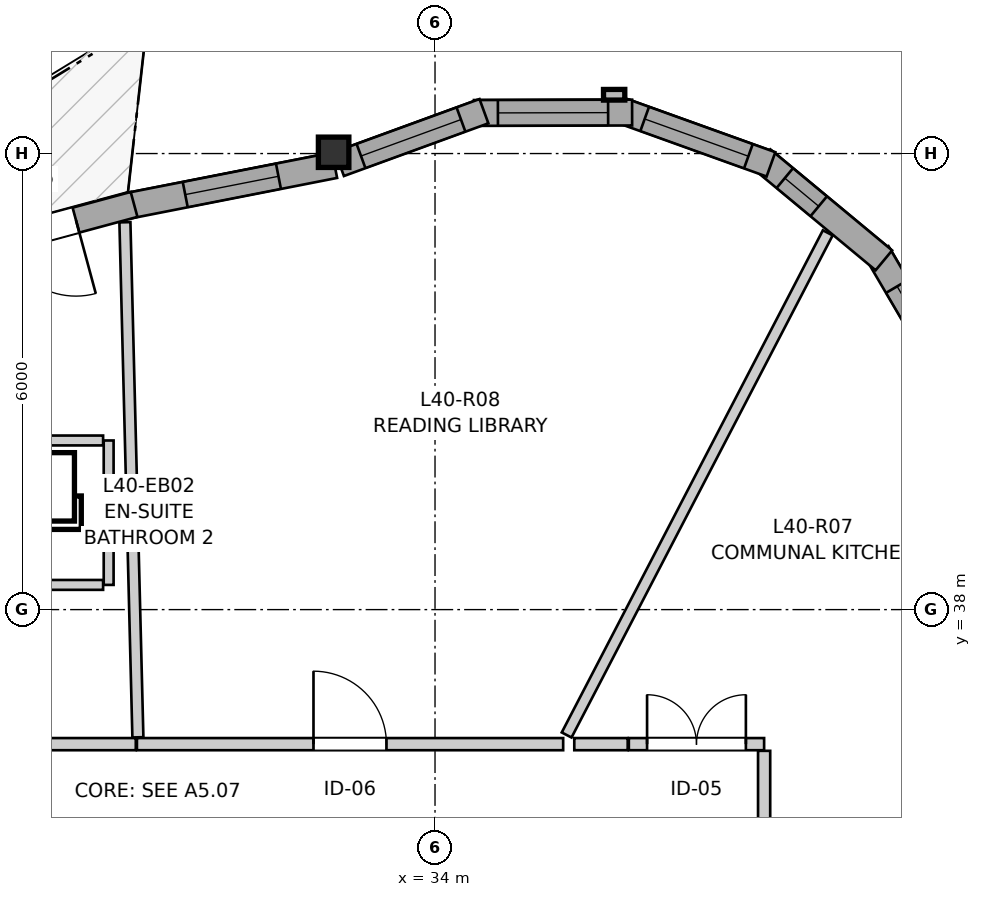
"""IFC4 building model, lengths in metres.
Left out: names, types, materials, properties, quantities, classifications, styles, units other than length and angle.
Written with IfcOpenShell. Run it as: python <this file> out.ifc"""

import sys

from ifc_helpers import new_model, si_unit, direction, frame, frame_2d, origin, origin_2d, place, context, subcontext, project, spatial, rectangle, i_section, extrude, source, transform, mapped, element, fill, save


model = new_model("IFC4")
c1 = context("Model", 3, precision=1e-05, world=origin(), true_north=direction((0.0, 1.0)))
c2 = subcontext(c1, "Body", "Model", "MODEL_VIEW")
j1 = project(units=[si_unit("LENGTHUNIT", "METRE"), si_unit("PLANEANGLEUNIT", "RADIAN")], contexts=[c1])
p1 = place(None, origin())
s1 = spatial("IfcSite", under=j1, at=p1, CompositionType="ELEMENT")
p2 = place(p1, origin())
s2 = spatial("IfcBuilding", under=s1, at=p2, CompositionType="ELEMENT")
p3 = place(p2, frame((0.0, 0.0, 136.2)))
s3 = spatial("IfcBuildingStorey", under=s2, at=p3, CompositionType="ELEMENT", Elevation=136.2)
m1 = source(origin(), c2, "Body", "SweptSolid", [
    extrude(i_section(OverallWidth=0.401, OverallDepth=0.399, WebThickness=0.023, FlangeThickness=0.036, FilletRadius=0.015, at=origin_2d()), origin(), (0.0, 0.0, 1.0), 2.95),
])
p4 = place(p3, frame((32.666, 44.017, 0.0), z_axis=(0.0, 0.0, 1.0), x_axis=(1.0, 0.0, 0.0)))
e1 = element("IfcColumn", 1, at=p4, inside=s3, PredefinedType="PILASTER", context=c2, shape_type="MappedRepresentation", body=[
    mapped(m1, transform((0.0, 0.0, 0.0), x_axis=(1.0, 0.0, 0.0), y_axis=(0.0, 1.0, 0.0), z_axis=(0.0, 0.0, 1.0), scale=1.0)),
])
p5 = place(p3, frame((40.873, 40.902, 0.0), z_axis=(0.0, 0.0, 1.0), x_axis=(-0.506225227923, 0.862401309493, 0.0)))
e2 = element("IfcWall", 2, at=p5, inside=s3, PredefinedType="SOLIDWALL", context=c2, shape_type="SweptSolid", body=[
    extrude(rectangle(XDim=2.081, YDim=0.34, at=frame_2d((1.041, 0.0))), origin(), (0.0, 0.0, 1.0), 2.53),
])
p6 = place(p5, frame((0.516, 0.0, 0.82)))
e3 = element("IfcOpeningElement", 3, at=p6, cuts=e2, PredefinedType="OPENING", context=c2, shape_type="SweptSolid", body=[
    extrude(rectangle(XDim=1.05, YDim=1.45, at=frame_2d((0.525, 0.725))), frame((0.0, 0.18, 0.0), z_axis=(0.0, -1.0, 0.0), x_axis=(1.0, 0.0, 0.0)), (0.0, 0.0, 1.0), 0.36),
])
p7 = place(p3, frame((39.906, 42.595, 0.0), z_axis=(0.0, 0.0, 1.0), x_axis=(-0.769584999316, 0.638544382817, 0.0)))
e4 = element("IfcWall", 4, at=p7, inside=s3, PredefinedType="SOLIDWALL", context=c2, shape_type="SweptSolid", body=[
    extrude(rectangle(XDim=2.081, YDim=0.34, at=frame_2d((1.041, 0.0))), origin(), (0.0, 0.0, 1.0), 2.53),
])
p8 = place(p7, frame((1.114, 0.0, 0.82)))
e5 = element("IfcOpeningElement", 5, at=p8, cuts=e4, PredefinedType="OPENING", context=c2, shape_type="SweptSolid", body=[
    extrude(rectangle(XDim=0.58, YDim=1.35, at=frame_2d((0.29, 0.675))), frame((0.0, 0.18, 0.0), z_axis=(0.0, -1.0, 0.0), x_axis=(1.0, 0.0, 0.0)), (0.0, 0.0, 1.0), 0.36),
])
p9 = place(p3, frame((38.42, 43.858, 0.0), z_axis=(0.0, 0.0, 1.0), x_axis=(-0.941071215914, 0.338208466153, 0.0)))
e6 = element("IfcWall", 6, at=p9, inside=s3, PredefinedType="SOLIDWALL", context=c2, shape_type="SweptSolid", body=[
    extrude(rectangle(XDim=2.081, YDim=0.34, at=frame_2d((1.041, 0.0))), origin(), (0.0, 0.0, 1.0), 2.53),
])
p10 = place(p9, frame((0.316, 0.0, 0.82)))
e7 = element("IfcOpeningElement", 7, at=p10, cuts=e6, PredefinedType="OPENING", context=c2, shape_type="SweptSolid", body=[
    extrude(rectangle(XDim=1.45, YDim=1.25, at=frame_2d((0.725, 0.625))), frame((0.0, 0.18, 0.0), z_axis=(0.0, -1.0, 0.0), x_axis=(1.0, 0.0, 0.0)), (0.0, 0.0, 1.0), 0.36),
])
p11 = place(p3, frame((36.593, 44.539, 0.0), z_axis=(0.0, 0.0, 1.0), x_axis=(-0.999996965272, -0.002463624621, 0.0)))
e8 = element("IfcWall", 8, at=p11, inside=s3, PredefinedType="SOLIDWALL", context=c2, shape_type="SweptSolid", body=[
    extrude(rectangle(XDim=2.081, YDim=0.34, at=frame_2d((1.041, 0.0))), origin(), (0.0, 0.0, 1.0), 2.53),
])
p12 = place(p11, frame((0.316, 0.0, 0.82)))
e9 = element("IfcOpeningElement", 9, at=p12, cuts=e8, PredefinedType="OPENING", context=c2, shape_type="SweptSolid", body=[
    extrude(rectangle(XDim=1.45, YDim=1.25, at=frame_2d((0.725, 0.625))), frame((0.0, 0.18, 0.0), z_axis=(0.0, -1.0, 0.0), x_axis=(1.0, 0.0, 0.0)), (0.0, 0.0, 1.0), 0.36),
])
p13 = place(p3, frame((34.644, 44.557, 0.0), z_axis=(0.0, 0.0, 1.0), x_axis=(-0.939440593615, -0.342711790092, 0.0)))
e10 = element("IfcWall", 10, at=p13, inside=s3, PredefinedType="SOLIDWALL", context=c2, shape_type="SweptSolid", body=[
    extrude(rectangle(XDim=2.023, YDim=0.34, at=frame_2d((1.012, 0.0))), origin(), (0.0, 0.0, 1.0), 2.53),
])
p14 = place(p13, frame((0.322, 0.0, 0.82)))
e11 = element("IfcOpeningElement", 11, at=p14, cuts=e10, PredefinedType="OPENING", context=c2, shape_type="SweptSolid", body=[
    extrude(rectangle(XDim=1.4, YDim=1.35, at=frame_2d((0.7, 0.675))), frame((0.0, 0.18, 0.0), z_axis=(0.0, -1.0, 0.0), x_axis=(1.0, 0.0, 0.0)), (0.0, 0.0, 1.0), 0.36),
])
p15 = place(p3, frame((32.679, 43.846, 0.0), z_axis=(0.0, 0.0, 1.0), x_axis=(-0.981247929568, -0.192749839736, 0.0)))
e12 = element("IfcWall", 12, at=p15, inside=s3, PredefinedType="SOLIDWALL", context=c2, shape_type="SweptSolid", body=[
    extrude(rectangle(XDim=2.776, YDim=0.34, at=frame_2d((1.388, 0.0))), origin(), (0.0, 0.0, 1.0), 2.53),
])
p16 = place(p15, frame((0.753, 0.0, 0.82)))
e13 = element("IfcOpeningElement", 13, at=p16, cuts=e12, PredefinedType="OPENING", context=c2, shape_type="SweptSolid", body=[
    extrude(rectangle(XDim=1.25, YDim=1.35, at=frame_2d((0.625, 0.675))), frame((0.0, 0.18, 0.0), z_axis=(0.0, -1.0, 0.0), x_axis=(1.0, 0.0, 0.0)), (0.0, 0.0, 1.0), 0.36),
])
p17 = place(p3, frame((30.04, 43.331, 0.0), z_axis=(0.0, 0.0, 1.0), x_axis=(-0.965460468502, -0.260549580233, 0.0)))
e14 = element("IfcWall", 14, at=p17, inside=s3, PredefinedType="SOLIDWALL", context=c2, shape_type="SweptSolid", body=[
    extrude(rectangle(XDim=2.583, YDim=0.34, at=frame_2d((1.292, 0.0))), origin(), (0.0, 0.0, 1.0), 2.53),
])
p18 = place(p17, frame((0.792, 0.0, 0.0)))
e15 = element("IfcOpeningElement", 15, at=p18, cuts=e14, PredefinedType="OPENING", context=c2, shape_type="SweptSolid", body=[
    extrude(rectangle(XDim=1.0, YDim=2.1, at=frame_2d((0.5, 1.05))), frame((0.0, 0.18, 0.0), z_axis=(0.0, -1.0, 0.0), x_axis=(1.0, 0.0, 0.0)), (0.0, 0.0, 1.0), 0.36),
])
p19 = place(p3, frame((30.078, 36.23, 0.0), z_axis=(0.0, 0.0, 1.0), x_axis=(1.0, 0.0, 0.0)))
e16 = element("IfcWall", 16, at=p19, inside=s3, PredefinedType="PARTITIONING", context=c2, shape_type="SweptSolid", body=[
    extrude(rectangle(XDim=5.608, YDim=0.16, at=frame_2d((2.804, 0.0))), origin(), (0.0, 0.0, 1.0), 2.588),
])
p20 = place(p19, frame((2.323, 0.0, 0.0)))
e17 = element("IfcOpeningElement", 17, at=p20, cuts=e16, PredefinedType="OPENING", context=c2, shape_type="SweptSolid", body=[
    extrude(rectangle(XDim=0.96, YDim=2.1, at=frame_2d((0.48, 1.05))), frame((0.0, 0.09, 0.0), z_axis=(0.0, -1.0, 0.0), x_axis=(1.0, 0.0, 0.0)), (0.0, 0.0, 1.0), 0.18),
])
p21 = place(p3, frame((25.99, 36.23, 0.0), z_axis=(0.0, 0.0, 1.0), x_axis=(1.0, 0.0, 0.0)))
e18 = element("IfcWall", 18, at=p21, inside=s3, PredefinedType="PARTITIONING", context=c2, shape_type="SweptSolid", body=[
    extrude(rectangle(XDim=4.073, YDim=0.16, at=frame_2d((2.037, 0.0))), origin(), (0.0, 0.0, 1.0), 2.95),
])
p22 = place(p21, frame((1.6, 0.0, 0.0)))
e19 = element("IfcOpeningElement", 19, at=p22, cuts=e18, PredefinedType="OPENING", context=c2, shape_type="SweptSolid", body=[
    extrude(rectangle(XDim=0.92, YDim=2.1, at=frame_2d((0.46, 1.05))), frame((0.0, 0.09, 0.0), z_axis=(0.0, -1.0, 0.0), x_axis=(1.0, 0.0, 0.0)), (0.0, 0.0, 1.0), 0.18),
])
p23 = place(p3, frame((36.55, 36.23, 0.0), z_axis=(0.0, 0.0, 1.0), x_axis=(1.0, 0.0, 0.0)))
e20 = element("IfcWall", 20, at=p23, inside=s3, PredefinedType="PARTITIONING", context=c2, shape_type="SweptSolid", body=[
    extrude(rectangle(XDim=1.78, YDim=0.16, at=frame_2d((0.89, 0.0))), origin(), (0.0, 0.0, 1.0), 2.95),
])
p24 = place(p23, frame((0.24, 0.0, 0.0)))
e21 = element("IfcOpeningElement", 21, at=p24, cuts=e20, PredefinedType="OPENING", context=c2, shape_type="SweptSolid", body=[
    extrude(rectangle(XDim=1.3, YDim=2.1, at=frame_2d((0.65, 1.05))), frame((0.0, 0.09, 0.0), z_axis=(0.0, -1.0, 0.0), x_axis=(1.0, 0.0, 0.0)), (0.0, 0.0, 1.0), 0.18),
])
p25 = place(p3, frame((35.732, 36.351, 0.0), z_axis=(0.0, 0.0, 1.0), x_axis=(0.461386804, 0.887199085378, 0.0)))
e22 = element("IfcWall", 22, at=p25, inside=s3, PredefinedType="PARTITIONING", context=c2, shape_type="SweptSolid", body=[
    extrude(rectangle(XDim=7.446, YDim=0.145, at=frame_2d((3.723, 0.0))), origin(), (0.0, 0.0, 1.0), 2.95),
])
p26 = place(p3, frame((29.92, 43.096, 0.0), z_axis=(0.0, 0.0, 1.0), x_axis=(0.025211755772, -0.999682133166, 0.0)))
e23 = element("IfcWall", 23, at=p26, inside=s3, PredefinedType="PARTITIONING", context=c2, shape_type="SweptSolid", body=[
    extrude(rectangle(XDim=6.779, YDim=0.145, at=frame_2d((3.389, 0.0))), origin(), (0.0, 0.0, 1.0), 2.95),
])
p27 = place(p3, frame((38.465, 33.405, 0.0), z_axis=(0.0, 0.0, 1.0), x_axis=(0.738623645331, 0.674118024205, 0.0)))
e24 = element("IfcWall", 24, at=p27, inside=s3, PredefinedType="PARTITIONING", context=c2, shape_type="SweptSolid", body=[
    extrude(rectangle(XDim=4.629, YDim=0.145, at=frame_2d((2.314, 0.0))), origin(), (0.0, 0.0, 1.0), 2.95),
])
p28 = place(p3, frame((29.706, 38.325, 0.0), z_axis=(0.0, 0.0, 1.0), x_axis=(0.0, 1.0, 0.0)))
e25 = element("IfcWall", 25, at=p28, inside=s3, PredefinedType="PARTITIONING", context=c2, shape_type="SweptSolid", body=[
    extrude(rectangle(XDim=1.9, YDim=0.13, at=frame_2d((0.95, 0.0))), origin(), (0.0, 0.0, 1.0), 2.95),
])
p29 = place(p3, frame((27.979, 40.225, 0.0), z_axis=(0.0, 0.0, 1.0), x_axis=(1.0, 0.0, 0.0)))
e26 = element("IfcWall", 26, at=p29, inside=s3, PredefinedType="PARTITIONING", context=c2, shape_type="SweptSolid", body=[
    extrude(rectangle(XDim=1.654, YDim=0.13, at=frame_2d((0.827, 0.0))), origin(), (0.0, 0.0, 1.0), 2.558),
])
p30 = place(p3, frame((27.979, 38.325, 0.0), z_axis=(0.0, 0.0, 1.0), x_axis=(1.0, 0.0, 0.0)))
e27 = element("IfcWall", 27, at=p30, inside=s3, PredefinedType="PARTITIONING", context=c2, shape_type="SweptSolid", body=[
    extrude(rectangle(XDim=1.654, YDim=0.13, at=frame_2d((0.827, 0.0))), origin(), (0.0, 0.0, 1.0), 2.95),
])
p31 = place(p3, frame((38.33, 34.45, 0.0), z_axis=(0.0, 0.0, 1.0), x_axis=(0.0, 1.0, 0.0)))
e28 = element("IfcWall", 28, at=p31, inside=s3, PredefinedType="PARTITIONING", context=c2, shape_type="SweptSolid", body=[
    extrude(rectangle(XDim=1.692, YDim=0.16, at=frame_2d((0.846, 0.0))), origin(), (0.0, 0.0, 1.0), 2.588),
])
p32 = place(p3, frame((35.832, 36.23, 0.0), z_axis=(0.0, 0.0, 1.0), x_axis=(1.0, 0.0, 0.0)))
e29 = element("IfcWall", 29, at=p32, inside=s3, PredefinedType="PARTITIONING", context=c2, shape_type="SweptSolid", body=[
    extrude(rectangle(XDim=0.703, YDim=0.16, at=frame_2d((0.351, 0.0))), origin(), (0.0, 0.0, 1.0), 2.95),
])
m2 = source(origin(), c2, "Body", "SweptSolid", [
    extrude(rectangle(XDim=1.05, YDim=1.45, at=frame_2d((0.525, 0.725))), frame((0.0, 0.03, 0.0), z_axis=(0.0, -1.0, 0.0), x_axis=(1.0, 0.0, 0.0)), (0.0, 0.0, 1.0), 0.06),
])
p33 = place(p6, origin())
e30 = element("IfcWindow", 30, at=p33, inside=s3, PartitioningType="SINGLE_PANEL", PredefinedType="WINDOW", context=c2, shape_type="MappedRepresentation", body=[
    mapped(m2, transform((0.0, 0.0, 0.0), x_axis=(1.0, 0.0, 0.0), y_axis=(0.0, 1.0, 0.0), z_axis=(0.0, 0.0, 1.0), scale=1.0)),
])
fill(e3, e30)
m3 = source(origin(), c2, "Body", "SweptSolid", [
    extrude(rectangle(XDim=0.58, YDim=1.35, at=frame_2d((0.29, 0.675))), frame((0.0, 0.03, 0.0), z_axis=(0.0, -1.0, 0.0), x_axis=(1.0, 0.0, 0.0)), (0.0, 0.0, 1.0), 0.06),
])
p34 = place(p8, origin())
e31 = element("IfcWindow", 31, at=p34, inside=s3, PartitioningType="SINGLE_PANEL", PredefinedType="WINDOW", context=c2, shape_type="MappedRepresentation", body=[
    mapped(m3, transform((0.0, 0.0, 0.0), x_axis=(1.0, 0.0, 0.0), y_axis=(0.0, 1.0, 0.0), z_axis=(0.0, 0.0, 1.0), scale=1.0)),
])
fill(e5, e31)
m4 = source(origin(), c2, "Body", "SweptSolid", [
    extrude(rectangle(XDim=1.45, YDim=1.25, at=frame_2d((0.725, 0.625))), frame((0.0, 0.03, 0.0), z_axis=(0.0, -1.0, 0.0), x_axis=(1.0, 0.0, 0.0)), (0.0, 0.0, 1.0), 0.06),
])
p35 = place(p10, origin())
e32 = element("IfcWindow", 32, at=p35, inside=s3, PartitioningType="SINGLE_PANEL", PredefinedType="WINDOW", context=c2, shape_type="MappedRepresentation", body=[
    mapped(m4, transform((0.0, 0.0, 0.0), x_axis=(1.0, 0.0, 0.0), y_axis=(0.0, 1.0, 0.0), z_axis=(0.0, 0.0, 1.0), scale=1.0)),
])
fill(e7, e32)
p36 = place(p12, origin())
e33 = element("IfcWindow", 33, at=p36, inside=s3, PartitioningType="SINGLE_PANEL", PredefinedType="WINDOW", context=c2, shape_type="MappedRepresentation", body=[
    mapped(m4, transform((0.0, 0.0, 0.0), x_axis=(1.0, 0.0, 0.0), y_axis=(0.0, 1.0, 0.0), z_axis=(0.0, 0.0, 1.0), scale=1.0)),
])
fill(e9, e33)
m5 = source(origin(), c2, "Body", "SweptSolid", [
    extrude(rectangle(XDim=1.4, YDim=1.35, at=frame_2d((0.7, 0.675))), frame((0.0, 0.03, 0.0), z_axis=(0.0, -1.0, 0.0), x_axis=(1.0, 0.0, 0.0)), (0.0, 0.0, 1.0), 0.06),
])
p37 = place(p14, origin())
e34 = element("IfcWindow", 34, at=p37, inside=s3, PartitioningType="SINGLE_PANEL", PredefinedType="WINDOW", context=c2, shape_type="MappedRepresentation", body=[
    mapped(m5, transform((0.0, 0.0, 0.0), x_axis=(1.0, 0.0, 0.0), y_axis=(0.0, 1.0, 0.0), z_axis=(0.0, 0.0, 1.0), scale=1.0)),
])
fill(e11, e34)
m6 = source(origin(), c2, "Body", "SweptSolid", [
    extrude(rectangle(XDim=1.25, YDim=1.35, at=frame_2d((0.625, 0.675))), frame((0.0, 0.03, 0.0), z_axis=(0.0, -1.0, 0.0), x_axis=(1.0, 0.0, 0.0)), (0.0, 0.0, 1.0), 0.06),
])
p38 = place(p16, origin())
e35 = element("IfcWindow", 35, at=p38, inside=s3, PartitioningType="SINGLE_PANEL", PredefinedType="WINDOW", context=c2, shape_type="MappedRepresentation", body=[
    mapped(m6, transform((0.0, 0.0, 0.0), x_axis=(1.0, 0.0, 0.0), y_axis=(0.0, 1.0, 0.0), z_axis=(0.0, 0.0, 1.0), scale=1.0)),
])
fill(e13, e35)
m7 = source(origin(), c2, "Body", "SweptSolid", [
    extrude(rectangle(XDim=1.0, YDim=2.1, at=frame_2d((0.5, 1.05))), frame((0.0, 0.025, 0.0), z_axis=(0.0, -1.0, 0.0), x_axis=(1.0, 0.0, 0.0)), (0.0, 0.0, 1.0), 0.05),
])
p39 = place(p18, origin())
e36 = element("IfcDoor", 36, at=p39, inside=s3, OperationType="SINGLE_SWING_LEFT", PredefinedType="DOOR", context=c2, shape_type="MappedRepresentation", body=[
    mapped(m7, transform((0.0, 0.0, 0.0), x_axis=(1.0, 0.0, 0.0), y_axis=(0.0, 1.0, 0.0), z_axis=(0.0, 0.0, 1.0), scale=1.0)),
])
fill(e15, e36)
m8 = source(origin(), c2, "Body", "SweptSolid", [
    extrude(rectangle(XDim=0.96, YDim=2.1, at=frame_2d((0.48, 1.05))), frame((0.0, 0.025, 0.0), z_axis=(0.0, -1.0, 0.0), x_axis=(1.0, 0.0, 0.0)), (0.0, 0.0, 1.0), 0.05),
])
p40 = place(p20, origin())
e37 = element("IfcDoor", 37, at=p40, inside=s3, OperationType="SINGLE_SWING_LEFT", PredefinedType="DOOR", context=c2, shape_type="MappedRepresentation", body=[
    mapped(m8, transform((0.0, 0.0, 0.0), x_axis=(1.0, 0.0, 0.0), y_axis=(0.0, 1.0, 0.0), z_axis=(0.0, 0.0, 1.0), scale=1.0)),
])
fill(e17, e37)
m9 = source(origin(), c2, "Body", "SweptSolid", [
    extrude(rectangle(XDim=1.3, YDim=2.1, at=frame_2d((0.65, 1.05))), frame((0.0, 0.025, 0.0), z_axis=(0.0, -1.0, 0.0), x_axis=(1.0, 0.0, 0.0)), (0.0, 0.0, 1.0), 0.05),
])
p41 = place(p24, origin())
e38 = element("IfcDoor", 38, at=p41, inside=s3, OperationType="DOUBLE_DOOR_SINGLE_SWING", PredefinedType="DOOR", context=c2, shape_type="MappedRepresentation", body=[
    mapped(m9, transform((0.0, 0.0, 0.0), x_axis=(1.0, 0.0, 0.0), y_axis=(0.0, 1.0, 0.0), z_axis=(0.0, 0.0, 1.0), scale=1.0)),
])
fill(e21, e38)
save(model, sys.argv[1])
